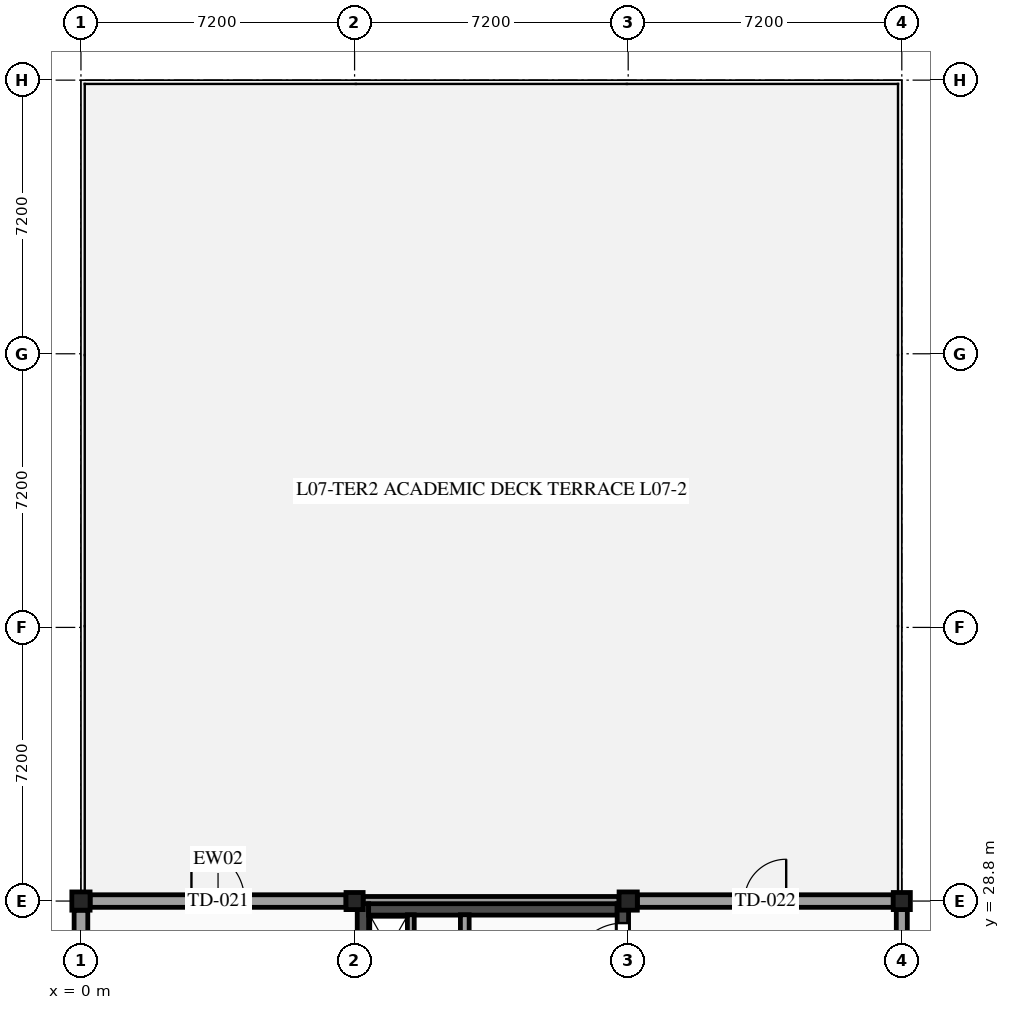
"""IFC4 building model, lengths in metres.
Left out: names, types, materials, properties, quantities, classifications, styles, units other than length and angle.
Written with IfcOpenShell. Run it as: python <this file> out.ifc"""

import sys

from ifc_helpers import new_model, si_unit, direction, frame, frame_2d, origin, origin_2d, place, context, subcontext, project, spatial, rectangle, extrude, element, fill, save


model = new_model("IFC4")
c1 = context("Model", 3, precision=1e-05, world=origin(), true_north=direction((0.0, 1.0)))
c2 = subcontext(c1, "Body", "Model", "MODEL_VIEW")
j1 = project(units=[si_unit("LENGTHUNIT", "METRE"), si_unit("PLANEANGLEUNIT", "RADIAN")], contexts=[c1])
p1 = place(None, origin())
s1 = spatial("IfcSite", under=j1, at=p1, CompositionType="ELEMENT")
p2 = place(p1, origin())
s2 = spatial("IfcBuilding", under=s1, at=p2, CompositionType="ELEMENT")
p3 = place(p2, frame((0.0, 0.0, 30.6)))
s3 = spatial("IfcBuildingStorey", under=s2, at=p3, CompositionType="ELEMENT", Elevation=30.6)
p4 = place(p3, frame((0.0, 28.8, 0.0), z_axis=(0.0, 0.0, 1.0), x_axis=(1.0, 0.0, 0.0)))
e1 = element("IfcColumn", 1, at=p4, inside=s3, PredefinedType="COLUMN", context=c2, shape_type="SweptSolid", body=[
    extrude(rectangle(XDim=0.48, YDim=0.48, at=origin_2d()), origin(), (0.0, 0.0, 1.0), 3.9),
])
p5 = place(p3, frame((7.2, 28.8, 0.0), z_axis=(0.0, 0.0, 1.0), x_axis=(1.0, 0.0, 0.0)))
e2 = element("IfcColumn", 2, at=p5, inside=s3, PredefinedType="COLUMN", context=c2, shape_type="SweptSolid", body=[
    extrude(rectangle(XDim=0.45, YDim=0.45, at=origin_2d()), origin(), (0.0, 0.0, 1.0), 3.9),
])
p6 = place(p3, frame((14.4, 28.8, 0.0), z_axis=(0.0, 0.0, 1.0), x_axis=(1.0, 0.0, 0.0)))
e3 = element("IfcColumn", 3, at=p6, inside=s3, PredefinedType="COLUMN", context=c2, shape_type="SweptSolid", body=[
    extrude(rectangle(XDim=0.48, YDim=0.48, at=origin_2d()), origin(), (0.0, 0.0, 1.0), 3.9),
])
p7 = place(p3, frame((21.6, 28.8, 0.0), z_axis=(0.0, 0.0, 1.0), x_axis=(1.0, 0.0, 0.0)))
e4 = element("IfcColumn", 4, at=p7, inside=s3, PredefinedType="COLUMN", context=c2, shape_type="SweptSolid", body=[
    extrude(rectangle(XDim=0.45, YDim=0.45, at=origin_2d()), origin(), (0.0, 0.0, 1.0), 3.9),
])
p8 = place(p3, frame((0.0, 21.825, 0.0), z_axis=(0.0, 0.0, 1.0), x_axis=(0.0, 1.0, 0.0)))
e5 = element("IfcWall", 5, at=p8, inside=s3, PredefinedType="STANDARD", context=c2, shape_type="SweptSolid", body=[
    extrude(rectangle(XDim=6.735, YDim=0.36, at=frame_2d((3.368, 0.0))), origin(), (0.0, 0.0, 1.0), 2.88),
])
p9 = place(p8, frame((1.571, 0.0, 1.15)))
e6 = element("IfcOpeningElement", 6, at=p9, cuts=e5, PredefinedType="OPENING", context=c2, shape_type="SweptSolid", body=[
    extrude(rectangle(XDim=0.9, YDim=1.3, at=frame_2d((0.45, 0.65))), frame((0.0, 0.19, 0.0), z_axis=(0.0, -1.0, 0.0), x_axis=(1.0, 0.0, 0.0)), (0.0, 0.0, 1.0), 0.38),
])
p10 = place(p8, frame((4.264, 0.0, 1.15)))
e7 = element("IfcOpeningElement", 7, at=p10, cuts=e5, PredefinedType="OPENING", context=c2, shape_type="SweptSolid", body=[
    extrude(rectangle(XDim=0.9, YDim=1.3, at=frame_2d((0.45, 0.65))), frame((0.0, 0.19, 0.0), z_axis=(0.0, -1.0, 0.0), x_axis=(1.0, 0.0, 0.0)), (0.0, 0.0, 1.0), 0.38),
])
p11 = place(p3, frame((0.24, 28.8, 0.0), z_axis=(0.0, 0.0, 1.0), x_axis=(1.0, 0.0, 0.0)))
e8 = element("IfcWall", 8, at=p11, inside=s3, PredefinedType="STANDARD", context=c2, shape_type="SweptSolid", body=[
    extrude(rectangle(XDim=6.735, YDim=0.33, at=frame_2d((3.368, 0.0))), origin(), (0.0, 0.0, 1.0), 2.88),
])
p12 = place(p11, frame((2.667, 0.0, 0.0)))
e9 = element("IfcOpeningElement", 9, at=p12, cuts=e8, PredefinedType="OPENING", context=c2, shape_type="SweptSolid", body=[
    extrude(rectangle(XDim=1.4, YDim=2.25, at=frame_2d((0.7, 1.125))), frame((0.0, 0.175, 0.0), z_axis=(0.0, -1.0, 0.0), x_axis=(1.0, 0.0, 0.0)), (0.0, 0.0, 1.0), 0.35),
])
p13 = place(p3, frame((7.425, 28.8, 0.0), z_axis=(0.0, 0.0, 1.0), x_axis=(1.0, 0.0, 0.0)))
e10 = element("IfcWall", 10, at=p13, inside=s3, PredefinedType="STANDARD", context=c2, shape_type="SweptSolid", body=[
    extrude(rectangle(XDim=6.735, YDim=0.24, at=frame_2d((3.367, 0.0))), origin(), (0.0, 0.0, 1.0), 2.88),
])
p14 = place(p3, frame((14.64, 28.8, 0.0), z_axis=(0.0, 0.0, 1.0), x_axis=(1.0, 0.0, 0.0)))
e11 = element("IfcWall", 11, at=p14, inside=s3, PredefinedType="STANDARD", context=c2, shape_type="SweptSolid", body=[
    extrude(rectangle(XDim=6.735, YDim=0.33, at=frame_2d((3.368, 0.0))), origin(), (0.0, 0.0, 1.0), 2.88),
])
p15 = place(p14, frame((2.817, 0.0, 0.0)))
e12 = element("IfcOpeningElement", 12, at=p15, cuts=e11, PredefinedType="OPENING", context=c2, shape_type="SweptSolid", body=[
    extrude(rectangle(XDim=1.1, YDim=2.2, at=frame_2d((0.55, 1.1))), frame((0.0, 0.175, 0.0), z_axis=(0.0, -1.0, 0.0), x_axis=(1.0, 0.0, 0.0)), (0.0, 0.0, 1.0), 0.35),
])
p16 = place(p3, frame((21.6, 28.575, 0.0), z_axis=(0.0, 0.0, 1.0), x_axis=(0.0, -1.0, 0.0)))
e13 = element("IfcWall", 13, at=p16, inside=s3, PredefinedType="STANDARD", context=c2, shape_type="SweptSolid", body=[
    extrude(rectangle(XDim=6.735, YDim=0.29, at=frame_2d((3.367, 0.0))), origin(), (0.0, 0.0, 1.0), 2.88),
])
p17 = place(p16, frame((0.968, 0.0, 0.98)))
e14 = element("IfcOpeningElement", 14, at=p17, cuts=e13, PredefinedType="OPENING", context=c2, shape_type="SweptSolid", body=[
    extrude(rectangle(XDim=4.8, YDim=1.5, at=frame_2d((2.4, 0.75))), frame((0.0, 0.155, 0.0), z_axis=(0.0, -1.0, 0.0), x_axis=(1.0, 0.0, 0.0)), (0.0, 0.0, 1.0), 0.31),
])
p18 = place(p3, frame((7.42, 28.73, 0.0), z_axis=(0.0, 0.0, 1.0), x_axis=(0.0, -1.0, 0.0)))
e15 = element("IfcWall", 15, at=p18, inside=s3, PredefinedType="SHEAR", context=c2, shape_type="SweptSolid", body=[
    extrude(rectangle(XDim=7.06, YDim=0.3, at=frame_2d((3.53, 0.0))), origin(), (0.0, 0.0, 1.0), 3.685),
])
p19 = place(p3, frame((7.57, 28.58, 0.0), z_axis=(0.0, 0.0, 1.0), x_axis=(1.0, 0.0, 0.0)))
e16 = element("IfcWall", 16, at=p19, inside=s3, PredefinedType="SHEAR", context=c2, shape_type="SweptSolid", body=[
    extrude(rectangle(XDim=6.54, YDim=0.3, at=frame_2d((3.27, 0.0))), origin(), (0.0, 0.0, 1.0), 3.685),
])
p20 = place(p3, frame((10.1, 26.7, 0.0), z_axis=(0.0, 0.0, 1.0), x_axis=(0.0, 1.0, 0.0)))
e17 = element("IfcWall", 17, at=p20, inside=s3, PredefinedType="PARTITIONING", context=c2, shape_type="SweptSolid", body=[
    extrude(rectangle(XDim=1.74, YDim=0.23, at=frame_2d((0.87, 0.0))), origin(), (0.0, 0.0, 1.0), 3.685),
])
p21 = place(p20, frame((0.45, 0.0, 0.0)))
e18 = element("IfcOpeningElement", 18, at=p21, cuts=e17, PredefinedType="OPENING", context=c2, shape_type="SweptSolid", body=[
    extrude(rectangle(XDim=0.85, YDim=2.1, at=frame_2d((0.425, 1.05))), frame((0.0, 0.125, 0.0), z_axis=(0.0, -1.0, 0.0), x_axis=(1.0, 0.0, 0.0)), (0.0, 0.0, 1.0), 0.25),
])
p22 = place(p3, frame((8.68, 26.68, 0.0), z_axis=(0.0, 0.0, 1.0), x_axis=(0.0, 1.0, 0.0)))
e19 = element("IfcWall", 19, at=p22, inside=s3, PredefinedType="PARTITIONING", context=c2, shape_type="SweptSolid", body=[
    extrude(rectangle(XDim=1.76, YDim=0.18, at=frame_2d((0.88, 0.0))), origin(), (0.0, 0.0, 1.0), 3.685),
])
p23 = place(p3, frame((14.26, 21.67, 0.0), z_axis=(0.0, 0.0, 1.0), x_axis=(0.0, 1.0, 0.0)))
e20 = element("IfcWall", 20, at=p23, inside=s3, PredefinedType="SHEAR", context=c2, shape_type="SweptSolid", body=[
    extrude(rectangle(XDim=7.06, YDim=0.3, at=frame_2d((3.53, 0.0))), origin(), (0.0, 0.0, 1.0), 3.685),
])
p24 = place(p23, frame((5.2, 0.0, 0.0)))
e21 = element("IfcOpeningElement", 21, at=p24, cuts=e20, PredefinedType="OPENING", context=c2, shape_type="SweptSolid", body=[
    extrude(rectangle(XDim=1.35, YDim=2.15, at=frame_2d((0.675, 1.075))), frame((0.0, 0.16, 0.0), z_axis=(0.0, -1.0, 0.0), x_axis=(1.0, 0.0, 0.0)), (0.0, 0.0, 1.0), 0.32),
])
p25 = place(p12, origin())
e22 = element("IfcDoor", 22, at=p25, inside=s3, OperationType="SINGLE_SWING_LEFT", PredefinedType="DOOR", context=c2, shape_type="SweptSolid", body=[
    extrude(rectangle(XDim=1.4, YDim=2.25, at=frame_2d((0.7, 1.125))), frame((0.0, 0.025, 0.0), z_axis=(0.0, -1.0, 0.0), x_axis=(1.0, 0.0, 0.0)), (0.0, 0.0, 1.0), 0.05),
])
fill(e9, e22)
p26 = place(p15, origin())
e23 = element("IfcDoor", 23, at=p26, inside=s3, OperationType="SINGLE_SWING_RIGHT", PredefinedType="DOOR", context=c2, shape_type="SweptSolid", body=[
    extrude(rectangle(XDim=1.1, YDim=2.2, at=frame_2d((0.55, 1.1))), frame((0.0, 0.025, 0.0), z_axis=(0.0, -1.0, 0.0), x_axis=(1.0, 0.0, 0.0)), (0.0, 0.0, 1.0), 0.05),
])
fill(e12, e23)
p27 = place(p24, origin())
e24 = element("IfcDoor", 24, at=p27, inside=s3, OperationType="SINGLE_SWING_LEFT", PredefinedType="DOOR", context=c2, shape_type="SweptSolid", body=[
    extrude(rectangle(XDim=1.35, YDim=2.15, at=frame_2d((0.675, 1.075))), frame((0.0, 0.025, 0.0), z_axis=(0.0, -1.0, 0.0), x_axis=(1.0, 0.0, 0.0)), (0.0, 0.0, 1.0), 0.05),
])
fill(e21, e24)
save(model, sys.argv[1])
